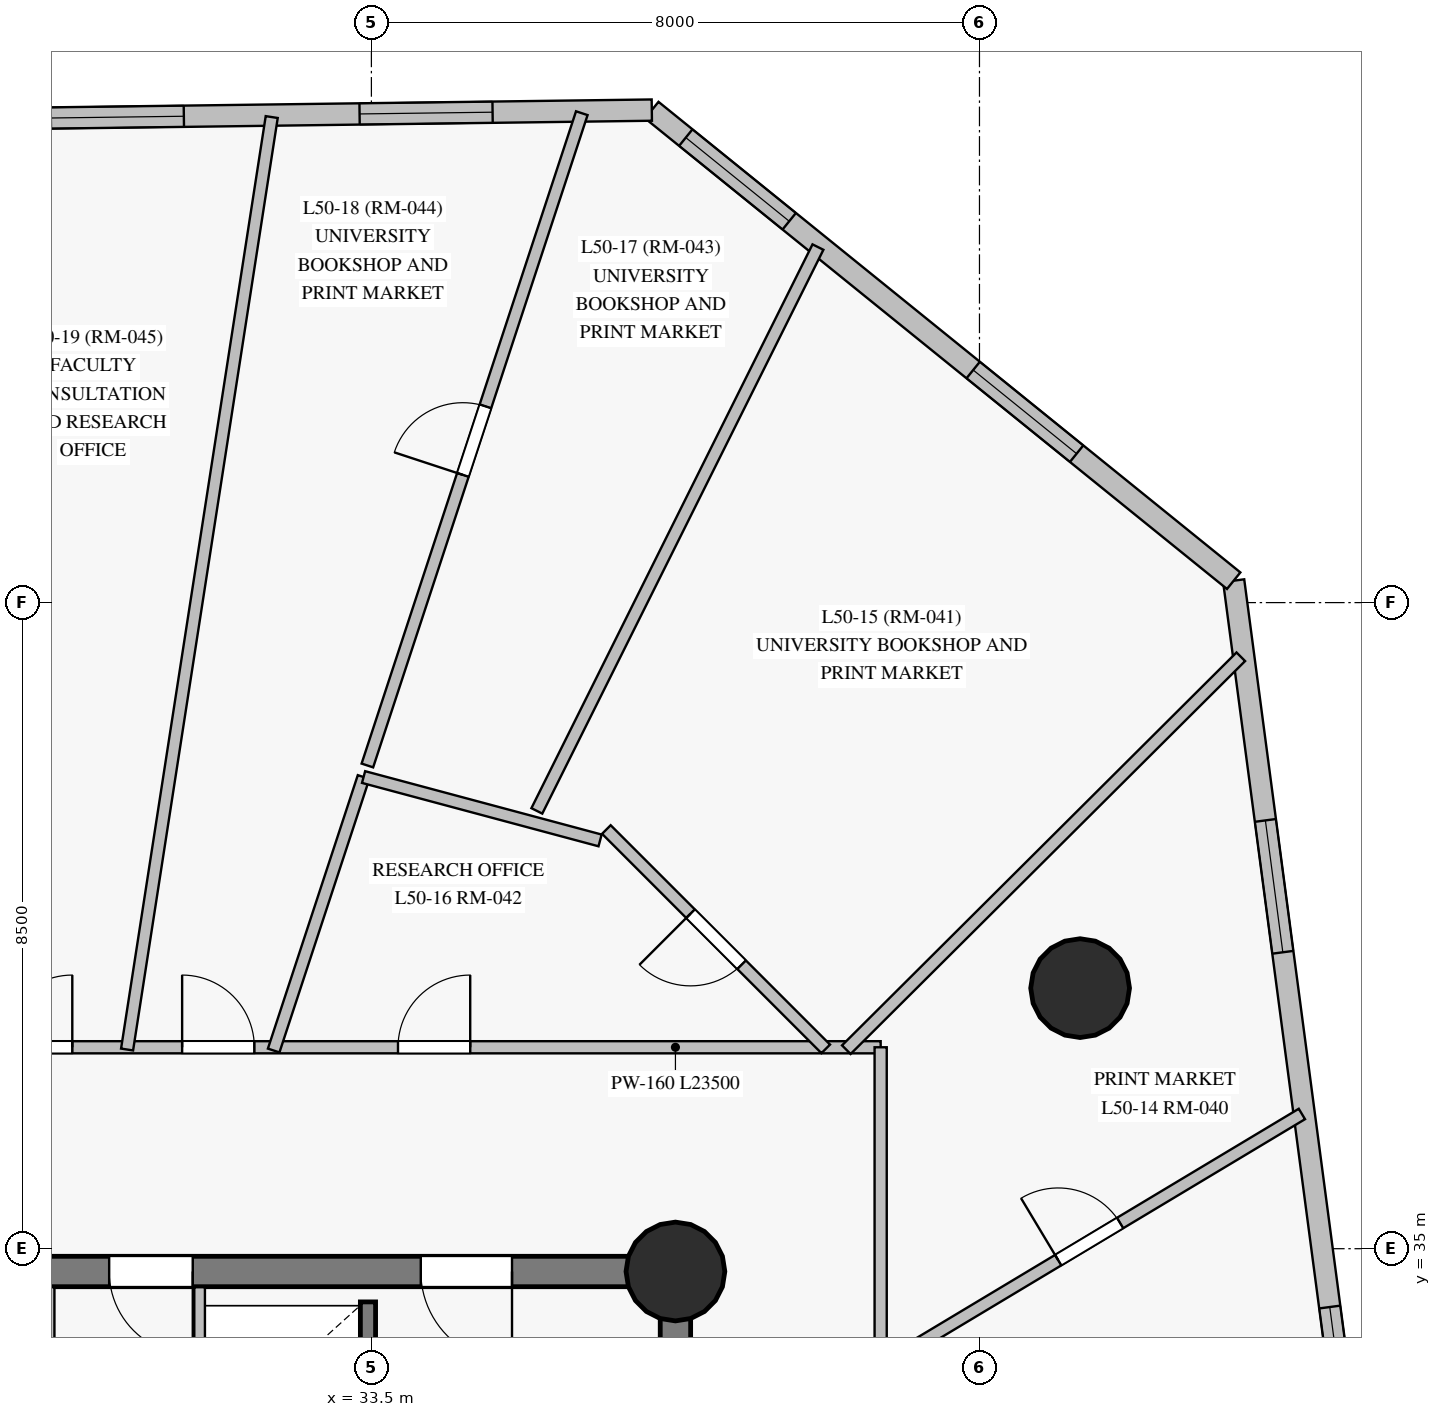
"""IFC4 building model, lengths in metres.
Left out: names, types, materials, properties, quantities, classifications, styles, units other than length and angle.
Written with IfcOpenShell. Run it as: python <this file> out.ifc"""

import sys

from ifc_helpers import new_model, si_unit, direction, frame, frame_2d, origin, origin_with_axes, origin_2d, place, context, subcontext, project, spatial, rectangle, circle, extrude, source, transform, mapped, element, fill, save


model = new_model("IFC4")
c1 = context("Model", 3, precision=1e-05, world=origin(), true_north=direction((0.0, 1.0)))
c2 = subcontext(c1, "Body", "Model", "MODEL_VIEW")
j1 = project(units=[si_unit("LENGTHUNIT", "METRE"), si_unit("PLANEANGLEUNIT", "RADIAN")], contexts=[c1])
p1 = place(None, origin())
s1 = spatial("IfcSite", under=j1, at=p1, CompositionType="ELEMENT")
p2 = place(p1, origin())
s2 = spatial("IfcBuilding", under=s1, at=p2, CompositionType="ELEMENT")
p3 = place(p2, frame((0.0, 0.0, 174.85)))
s3 = spatial("IfcBuildingStorey", under=s2, at=p3, CompositionType="ELEMENT", Elevation=174.85)
p4 = place(p3, frame((37.5, 18.3, 0.0), z_axis=(0.0, 0.0, 1.0), x_axis=(0.0, 1.0, 0.0)))
e1 = element("IfcWall", 1, at=p4, inside=s3, PredefinedType="SHEAR", context=c2, shape_type="SweptSolid", body=[
    extrude(rectangle(XDim=16.4, YDim=0.4, at=frame_2d((8.2, 0.0))), origin(), (0.0, 0.0, 1.0), 2.825),
])
p5 = place(p4, frame((14.15, 0.0, 0.0)))
e2 = element("IfcOpeningElement", 2, at=p5, cuts=e1, PredefinedType="OPENING", context=c2, shape_type="SweptSolid", body=[
    extrude(rectangle(XDim=1.2, YDim=2.15, at=frame_2d((0.6, 1.075))), frame((0.0, 0.21, 0.0), z_axis=(0.0, -1.0, 0.0), x_axis=(1.0, 0.0, 0.0)), (0.0, 0.0, 1.0), 0.42),
])
p6 = place(p3, frame((37.5, 34.7, 0.0), z_axis=(0.0, 0.0, 1.0), x_axis=(-1.0, 0.0, 0.0)))
e3 = element("IfcWall", 3, at=p6, inside=s3, PredefinedType="SHEAR", context=c2, shape_type="SweptSolid", body=[
    extrude(rectangle(XDim=10.95, YDim=0.4, at=frame_2d((5.475, 0.0))), origin(), (0.0, 0.0, 1.0), 2.825),
])
p7 = place(p6, frame((2.15, 0.0, 0.0)))
e4 = element("IfcOpeningElement", 4, at=p7, cuts=e3, PredefinedType="OPENING", context=c2, shape_type="SweptSolid", body=[
    extrude(rectangle(XDim=1.2, YDim=2.15, at=frame_2d((0.6, 1.075))), frame((0.0, 0.21, 0.0), z_axis=(0.0, -1.0, 0.0), x_axis=(1.0, 0.0, 0.0)), (0.0, 0.0, 1.0), 0.42),
])
p8 = place(p6, frame((6.35, 0.0, 0.0)))
e5 = element("IfcOpeningElement", 5, at=p8, cuts=e3, PredefinedType="OPENING", context=c2, shape_type="SweptSolid", body=[
    extrude(rectangle(XDim=1.1, YDim=2.15, at=frame_2d((0.55, 1.075))), frame((0.0, 0.21, 0.0), z_axis=(0.0, -1.0, 0.0), x_axis=(1.0, 0.0, 0.0)), (0.0, 0.0, 1.0), 0.42),
])
m1 = source(origin_with_axes(), c2, "Body", "SweptSolid", [
    extrude(circle(Radius=0.65, at=origin_2d()), origin(), (0.0, 0.0, 1.0), 3.05),
])
for number, where, z_axis, x_axis in (
    (6, (37.5, 34.7, 0.0), (0.0, 0.0, 1.0), (1.0, 0.0, 0.0)),
    (7, (42.824, 38.428, 0.0), (0.0, 0.0, 1.0), (1.0, 0.0, 0.0)),
):
    element("IfcColumn", number, at=place(p3, frame(where, z_axis=z_axis, x_axis=x_axis)), inside=s3, PredefinedType="COLUMN", context=c2, shape_type="MappedRepresentation", body=[
        mapped(m1, transform((0.0, 0.0, 0.0), scale=1.0)),
    ])
p9 = place(p3, frame((46.697, 29.785, 0.0), z_axis=(0.0, 0.0, 1.0), x_axis=(-0.131149267022, 0.991362632824, 0.0)))
e8 = element("IfcWall", 8, at=p9, inside=s3, PredefinedType="SOLIDWALL", context=c2, shape_type="SweptSolid", body=[
    extrude(rectangle(XDim=14.125, YDim=0.28, at=frame_2d((7.063, 0.0))), origin(), (0.0, 0.0, 1.0), 2.825),
])
p10 = place(p9, frame((2.737, 0.0, 0.85)))
e9 = element("IfcOpeningElement", 9, at=p10, cuts=e8, PredefinedType="OPENING", context=c2, shape_type="SweptSolid", body=[
    extrude(rectangle(XDim=1.75, YDim=1.65, at=frame_2d((0.875, 0.825))), frame((0.0, 0.15, 0.0), z_axis=(0.0, -1.0, 0.0), x_axis=(1.0, 0.0, 0.0)), (0.0, 0.0, 1.0), 0.3),
])
p11 = place(p9, frame((9.194, 0.0, 0.85)))
e10 = element("IfcOpeningElement", 10, at=p11, cuts=e8, PredefinedType="OPENING", context=c2, shape_type="SweptSolid", body=[
    extrude(rectangle(XDim=1.75, YDim=1.65, at=frame_2d((0.875, 0.825))), frame((0.0, 0.15, 0.0), z_axis=(0.0, -1.0, 0.0), x_axis=(1.0, 0.0, 0.0)), (0.0, 0.0, 1.0), 0.3),
])
p12 = place(p3, frame((44.844, 43.788, 0.0), z_axis=(0.0, 0.0, 1.0), x_axis=(-0.777531220347, 0.628844337961, 0.0)))
e11 = element("IfcWall", 11, at=p12, inside=s3, PredefinedType="SOLIDWALL", context=c2, shape_type="SweptSolid", body=[
    extrude(rectangle(XDim=9.845, YDim=0.28, at=frame_2d((4.923, 0.0))), origin(), (0.0, 0.0, 1.0), 2.825),
])
p13 = place(p12, frame((2.657, 0.0, 0.85)))
e12 = element("IfcOpeningElement", 12, at=p13, cuts=e11, PredefinedType="OPENING", context=c2, shape_type="SweptSolid", body=[
    extrude(rectangle(XDim=1.75, YDim=1.65, at=frame_2d((0.875, 0.825))), frame((0.0, 0.15, 0.0), z_axis=(0.0, -1.0, 0.0), x_axis=(1.0, 0.0, 0.0)), (0.0, 0.0, 1.0), 0.3),
])
p14 = place(p12, frame((7.52, 0.0, 0.85)))
e13 = element("IfcOpeningElement", 13, at=p14, cuts=e11, PredefinedType="OPENING", context=c2, shape_type="SweptSolid", body=[
    extrude(rectangle(XDim=1.75, YDim=1.65, at=frame_2d((0.875, 0.825))), frame((0.0, 0.15, 0.0), z_axis=(0.0, -1.0, 0.0), x_axis=(1.0, 0.0, 0.0)), (0.0, 0.0, 1.0), 0.3),
])
p15 = place(p3, frame((37.189, 49.979, 0.0), z_axis=(0.0, 0.0, 1.0), x_axis=(-0.999913830064, -0.013127545317, 0.0)))
e14 = element("IfcWall", 14, at=p15, inside=s3, PredefinedType="SOLIDWALL", context=c2, shape_type="SweptSolid", body=[
    extrude(rectangle(XDim=12.535, YDim=0.28, at=frame_2d((6.267, 0.0))), origin(), (0.0, 0.0, 1.0), 2.825),
])
p16 = place(p15, frame((2.095, 0.0, 0.85)))
e15 = element("IfcOpeningElement", 15, at=p16, cuts=e14, PredefinedType="OPENING", context=c2, shape_type="SweptSolid", body=[
    extrude(rectangle(XDim=1.75, YDim=1.65, at=frame_2d((0.875, 0.825))), frame((0.0, 0.15, 0.0), z_axis=(0.0, -1.0, 0.0), x_axis=(1.0, 0.0, 0.0)), (0.0, 0.0, 1.0), 0.3),
])
p17 = place(p15, frame((6.157, 0.0, 0.85)))
e16 = element("IfcOpeningElement", 16, at=p17, cuts=e14, PredefinedType="OPENING", context=c2, shape_type="SweptSolid", body=[
    extrude(rectangle(XDim=1.75, YDim=1.65, at=frame_2d((0.875, 0.825))), frame((0.0, 0.15, 0.0), z_axis=(0.0, -1.0, 0.0), x_axis=(1.0, 0.0, 0.0)), (0.0, 0.0, 1.0), 0.3),
])
p18 = place(p15, frame((9.56, 0.0, 0.85)))
e17 = element("IfcOpeningElement", 17, at=p18, cuts=e14, PredefinedType="OPENING", context=c2, shape_type="SweptSolid", body=[
    extrude(rectangle(XDim=0.95, YDim=1.5, at=frame_2d((0.475, 0.75))), frame((0.0, 0.15, 0.0), z_axis=(0.0, -1.0, 0.0), x_axis=(1.0, 0.0, 0.0)), (0.0, 0.0, 1.0), 0.3),
])
p19 = place(p3, frame((33.455, 18.7, 0.0), z_axis=(0.0, 0.0, 1.0), x_axis=(0.0, 1.0, 0.0)))
e18 = element("IfcWall", 18, at=p19, inside=s3, PredefinedType="SHEAR", context=c2, shape_type="SweptSolid", body=[
    extrude(rectangle(XDim=15.6, YDim=0.2, at=frame_2d((7.8, 0.0))), origin(), (0.0, 0.0, 1.0), 2.825),
])
p20 = place(p19, frame((2.75, 0.0, 0.0)))
e19 = element("IfcOpeningElement", 19, at=p20, cuts=e18, PredefinedType="OPENING", context=c2, shape_type="SweptSolid", body=[
    extrude(rectangle(XDim=1.15, YDim=2.15, at=frame_2d((0.575, 1.075))), frame((0.0, 0.11, 0.0), z_axis=(0.0, -1.0, 0.0), x_axis=(1.0, 0.0, 0.0)), (0.0, 0.0, 1.0), 0.22),
])
p21 = place(p19, frame((0.55, 0.0, 0.0)))
e20 = element("IfcOpeningElement", 20, at=p21, cuts=e18, PredefinedType="OPENING", context=c2, shape_type="SweptSolid", body=[
    extrude(rectangle(XDim=0.94, YDim=2.1, at=frame_2d((0.47, 1.05))), frame((0.0, 0.11, 0.0), z_axis=(0.0, -1.0, 0.0), x_axis=(1.0, 0.0, 0.0)), (0.0, 0.0, 1.0), 0.22),
])
p22 = place(p3, frame((16.7, 37.65, 0.0), z_axis=(0.0, 0.0, 1.0), x_axis=(1.0, 0.0, 0.0)))
e21 = element("IfcWall", 21, at=p22, inside=s3, PredefinedType="PARTITIONING", context=c2, shape_type="SweptSolid", body=[
    extrude(rectangle(XDim=23.5, YDim=0.16, at=frame_2d((11.75, 0.0))), origin(), (0.0, 0.0, 1.0), 2.375),
])
p23 = place(p22, frame((17.15, 0.0, 0.0)))
e22 = element("IfcOpeningElement", 22, at=p23, cuts=e21, PredefinedType="OPENING", context=c2, shape_type="SweptSolid", body=[
    extrude(rectangle(XDim=0.95, YDim=2.15, at=frame_2d((0.475, 1.075))), frame((0.0, 0.09, 0.0), z_axis=(0.0, -1.0, 0.0), x_axis=(1.0, 0.0, 0.0)), (0.0, 0.0, 1.0), 0.18),
])
p24 = place(p22, frame((14.31, 0.0, 0.0)))
e23 = element("IfcOpeningElement", 23, at=p24, cuts=e21, PredefinedType="OPENING", context=c2, shape_type="SweptSolid", body=[
    extrude(rectangle(XDim=0.95, YDim=2.15, at=frame_2d((0.475, 1.075))), frame((0.0, 0.09, 0.0), z_axis=(0.0, -1.0, 0.0), x_axis=(1.0, 0.0, 0.0)), (0.0, 0.0, 1.0), 0.18),
])
p25 = place(p22, frame((11.915, 0.0, 0.0)))
e24 = element("IfcOpeningElement", 24, at=p25, cuts=e21, PredefinedType="OPENING", context=c2, shape_type="SweptSolid", body=[
    extrude(rectangle(XDim=0.95, YDim=2.15, at=frame_2d((0.475, 1.075))), frame((0.0, 0.09, 0.0), z_axis=(0.0, -1.0, 0.0), x_axis=(1.0, 0.0, 0.0)), (0.0, 0.0, 1.0), 0.18),
])
p26 = place(p22, frame((7.75, 0.0, 0.0)))
e25 = element("IfcOpeningElement", 25, at=p26, cuts=e21, PredefinedType="OPENING", context=c2, shape_type="SweptSolid", body=[
    extrude(rectangle(XDim=0.95, YDim=2.15, at=frame_2d((0.475, 1.075))), frame((0.0, 0.09, 0.0), z_axis=(0.0, -1.0, 0.0), x_axis=(1.0, 0.0, 0.0)), (0.0, 0.0, 1.0), 0.18),
])
p27 = place(p22, frame((5.01, 0.0, 0.0)))
e26 = element("IfcOpeningElement", 26, at=p27, cuts=e21, PredefinedType="OPENING", context=c2, shape_type="SweptSolid", body=[
    extrude(rectangle(XDim=0.95, YDim=2.15, at=frame_2d((0.475, 1.075))), frame((0.0, 0.09, 0.0), z_axis=(0.0, -1.0, 0.0), x_axis=(1.0, 0.0, 0.0)), (0.0, 0.0, 1.0), 0.18),
])
p28 = place(p22, frame((0.257, 0.0, 0.0)))
e27 = element("IfcOpeningElement", 27, at=p28, cuts=e21, PredefinedType="OPENING", context=c2, shape_type="SweptSolid", body=[
    extrude(rectangle(XDim=0.95, YDim=2.15, at=frame_2d((0.475, 1.075))), frame((0.0, 0.09, 0.0), z_axis=(0.0, -1.0, 0.0), x_axis=(1.0, 0.0, 0.0)), (0.0, 0.0, 1.0), 0.18),
])
p29 = place(p3, frame((40.2, 37.65, 0.0), z_axis=(0.0, 0.0, 1.0), x_axis=(0.0, -1.0, 0.0)))
e28 = element("IfcWall", 28, at=p29, inside=s3, PredefinedType="PARTITIONING", context=c2, shape_type="SweptSolid", body=[
    extrude(rectangle(XDim=22.3, YDim=0.16, at=frame_2d((11.15, 0.0))), origin(), (0.0, 0.0, 1.0), 2.375),
])
p30 = place(p29, frame((14.02, 0.0, 0.0)))
e29 = element("IfcOpeningElement", 29, at=p30, cuts=e28, PredefinedType="OPENING", context=c2, shape_type="SweptSolid", body=[
    extrude(rectangle(XDim=0.95, YDim=2.15, at=frame_2d((0.475, 1.075))), frame((0.0, 0.09, 0.0), z_axis=(0.0, -1.0, 0.0), x_axis=(1.0, 0.0, 0.0)), (0.0, 0.0, 1.0), 0.18),
])
p31 = place(p29, frame((10.675, 0.0, 0.0)))
e30 = element("IfcOpeningElement", 30, at=p31, cuts=e28, PredefinedType="OPENING", context=c2, shape_type="SweptSolid", body=[
    extrude(rectangle(XDim=0.95, YDim=2.15, at=frame_2d((0.475, 1.075))), frame((0.0, 0.09, 0.0), z_axis=(0.0, -1.0, 0.0), x_axis=(1.0, 0.0, 0.0)), (0.0, 0.0, 1.0), 0.18),
])
p32 = place(p29, frame((7.33, 0.0, 0.0)))
e31 = element("IfcOpeningElement", 31, at=p32, cuts=e28, PredefinedType="OPENING", context=c2, shape_type="SweptSolid", body=[
    extrude(rectangle(XDim=0.95, YDim=2.15, at=frame_2d((0.475, 1.075))), frame((0.0, 0.09, 0.0), z_axis=(0.0, -1.0, 0.0), x_axis=(1.0, 0.0, 0.0)), (0.0, 0.0, 1.0), 0.18),
])
p33 = place(p3, frame((30.286, 37.62, 0.0), z_axis=(0.0, 0.0, 1.0), x_axis=(0.153299914958, 0.98817970839, 0.0)))
e32 = element("IfcWall", 32, at=p33, inside=s3, PredefinedType="PARTITIONING", context=c2, shape_type="SweptSolid", body=[
    extrude(rectangle(XDim=12.414, YDim=0.16, at=frame_2d((6.207, 0.0))), origin(), (0.0, 0.0, 1.0), 2.825),
])
p34 = place(p3, frame((33.447, 41.357, 0.0), z_axis=(0.0, 0.0, 1.0), x_axis=(0.312268283986, 0.949993957253, 0.0)))
e33 = element("IfcWall", 33, at=p34, inside=s3, PredefinedType="PARTITIONING", context=c2, shape_type="SweptSolid", body=[
    extrude(rectangle(XDim=9.033, YDim=0.16, at=frame_2d((4.517, 0.0))), origin(), (0.0, 0.0, 1.0), 2.825),
])
p35 = place(p34, frame((4.024, 0.0, 0.0)))
e34 = element("IfcOpeningElement", 34, at=p35, cuts=e33, PredefinedType="OPENING", context=c2, shape_type="SweptSolid", body=[
    extrude(rectangle(XDim=0.95, YDim=2.15, at=frame_2d((0.475, 1.075))), frame((0.0, 0.09, 0.0), z_axis=(0.0, -1.0, 0.0), x_axis=(1.0, 0.0, 0.0)), (0.0, 0.0, 1.0), 0.18),
])
p36 = place(p3, frame((35.677, 40.76, 0.0), z_axis=(0.0, 0.0, 1.0), x_axis=(0.446200020904, 0.894933260833, 0.0)))
e35 = element("IfcWall", 35, at=p36, inside=s3, PredefinedType="PARTITIONING", context=c2, shape_type="SweptSolid", body=[
    extrude(rectangle(XDim=8.288, YDim=0.16, at=frame_2d((4.144, 0.0))), origin(), (0.0, 0.0, 1.0), 2.825),
])
p37 = place(p3, frame((39.748, 37.618, 0.0), z_axis=(0.0, 0.0, 1.0), x_axis=(0.708505208344, 0.705705582909, 0.0)))
e36 = element("IfcWall", 36, at=p37, inside=s3, PredefinedType="PARTITIONING", context=c2, shape_type="SweptSolid", body=[
    extrude(rectangle(XDim=7.325, YDim=0.16, at=frame_2d((3.663, 0.0))), origin(), (0.0, 0.0, 1.0), 2.825),
])
p38 = place(p3, frame((40.174, 33.433, 0.0), z_axis=(0.0, 0.0, 1.0), x_axis=(0.857549328382, 0.514401739297, 0.0)))
e37 = element("IfcWall", 37, at=p38, inside=s3, PredefinedType="PARTITIONING", context=c2, shape_type="SweptSolid", body=[
    extrude(rectangle(XDim=6.492, YDim=0.16, at=frame_2d((3.246, 0.0))), origin(), (0.0, 0.0, 1.0), 2.825),
])
p39 = place(p38, frame((2.754, 0.0, 0.0)))
e38 = element("IfcOpeningElement", 38, at=p39, cuts=e37, PredefinedType="OPENING", context=c2, shape_type="SweptSolid", body=[
    extrude(rectangle(XDim=0.95, YDim=2.15, at=frame_2d((0.475, 1.075))), frame((0.0, 0.09, 0.0), z_axis=(0.0, -1.0, 0.0), x_axis=(1.0, 0.0, 0.0)), (0.0, 0.0, 1.0), 0.18),
])
p40 = place(p3, frame((39.477, 37.629, 0.0), z_axis=(0.0, 0.0, 1.0), x_axis=(-0.707136690743, 0.707076870365, 0.0)))
e39 = element("IfcWall", 39, at=p40, inside=s3, PredefinedType="PARTITIONING", context=c2, shape_type="SweptSolid", body=[
    extrude(rectangle(XDim=4.081, YDim=0.16, at=frame_2d((2.041, 0.0))), origin(), (0.0, 0.0, 1.0), 2.375),
])
p41 = place(p40, frame((1.566, 0.0, 0.0)))
e40 = element("IfcOpeningElement", 40, at=p41, cuts=e39, PredefinedType="OPENING", context=c2, shape_type="SweptSolid", body=[
    extrude(rectangle(XDim=0.95, YDim=2.15, at=frame_2d((0.475, 1.075))), frame((0.0, 0.09, 0.0), z_axis=(0.0, -1.0, 0.0), x_axis=(1.0, 0.0, 0.0)), (0.0, 0.0, 1.0), 0.18),
])
for number, where, z_axis, x_axis in (
    (41, (29.26, 30.45, 0.0), (0.0, 0.0, 1.0), (0.0, 1.0, 0.0)),
    (42, (31.24, 30.45, 0.0), (0.0, 0.0, 1.0), (0.0, 1.0, 0.0)),
):
    element("IfcWall", number, at=place(p3, frame(where, z_axis=z_axis, x_axis=x_axis)), inside=s3, PredefinedType="PARTITIONING", context=c2, shape_type="SweptSolid", body=[
        extrude(rectangle(XDim=4.043, YDim=0.14, at=frame_2d((2.021, 0.0))), origin(), (0.0, 0.0, 1.0), 2.825),
    ])
p42 = place(p3, frame((32.214, 37.607, 0.0), z_axis=(0.0, 0.0, 1.0), x_axis=(0.312337810946, 0.949971100536, 0.0)))
e43 = element("IfcWall", 43, at=p42, inside=s3, PredefinedType="PARTITIONING", context=c2, shape_type="SweptSolid", body=[
    extrude(rectangle(XDim=3.787, YDim=0.16, at=frame_2d((1.894, 0.0))), origin(), (0.0, 0.0, 1.0), 2.825),
])
p43 = place(p3, frame((33.397, 41.205, 0.0), z_axis=(0.0, 0.0, 1.0), x_axis=(0.965920984925, -0.258837112643, 0.0)))
e44 = element("IfcWall", 44, at=p43, inside=s3, PredefinedType="PARTITIONING", context=c2, shape_type="SweptSolid", body=[
    extrude(rectangle(XDim=3.221, YDim=0.16, at=frame_2d((1.611, 0.0))), origin(), (0.0, 0.0, 1.0), 2.495),
])
m2 = source(origin_with_axes(), c2, "Body", "SweptSolid", [
    extrude(rectangle(XDim=1.75, YDim=1.65, at=frame_2d((0.875, 0.825))), frame((0.0, 0.03, 0.0), z_axis=(0.0, -1.0, 0.0), x_axis=(1.0, 0.0, 0.0)), (0.0, 0.0, 1.0), 0.06),
])
p44 = place(p10, origin())
e45 = element("IfcWindow", 45, at=p44, inside=s3, PartitioningType="SINGLE_PANEL", PredefinedType="WINDOW", context=c2, shape_type="MappedRepresentation", body=[
    mapped(m2, transform((0.0, 0.0, 0.0), scale=1.0)),
])
fill(e9, e45)
p45 = place(p11, origin())
e46 = element("IfcWindow", 46, at=p45, inside=s3, PartitioningType="SINGLE_PANEL", PredefinedType="WINDOW", context=c2, shape_type="MappedRepresentation", body=[
    mapped(m2, transform((0.0, 0.0, 0.0), scale=1.0)),
])
fill(e10, e46)
p46 = place(p13, origin())
e47 = element("IfcWindow", 47, at=p46, inside=s3, PartitioningType="SINGLE_PANEL", PredefinedType="WINDOW", context=c2, shape_type="MappedRepresentation", body=[
    mapped(m2, transform((0.0, 0.0, 0.0), scale=1.0)),
])
fill(e12, e47)
p47 = place(p14, origin())
e48 = element("IfcWindow", 48, at=p47, inside=s3, PartitioningType="SINGLE_PANEL", PredefinedType="WINDOW", context=c2, shape_type="MappedRepresentation", body=[
    mapped(m2, transform((0.0, 0.0, 0.0), scale=1.0)),
])
fill(e13, e48)
p48 = place(p16, origin())
e49 = element("IfcWindow", 49, at=p48, inside=s3, PartitioningType="SINGLE_PANEL", PredefinedType="WINDOW", context=c2, shape_type="MappedRepresentation", body=[
    mapped(m2, transform((0.0, 0.0, 0.0), scale=1.0)),
])
fill(e15, e49)
p49 = place(p17, origin())
e50 = element("IfcWindow", 50, at=p49, inside=s3, PartitioningType="SINGLE_PANEL", PredefinedType="WINDOW", context=c2, shape_type="MappedRepresentation", body=[
    mapped(m2, transform((0.0, 0.0, 0.0), scale=1.0)),
])
fill(e16, e50)
m3 = source(origin_with_axes(), c2, "Body", "SweptSolid", [
    extrude(rectangle(XDim=1.2, YDim=2.15, at=frame_2d((0.6, 1.075))), frame((0.0, 0.025, 0.0), z_axis=(0.0, -1.0, 0.0), x_axis=(1.0, 0.0, 0.0)), (0.0, 0.0, 1.0), 0.05),
])
p50 = place(p7, origin())
e51 = element("IfcDoor", 51, at=p50, inside=s3, OperationType="SINGLE_SWING_LEFT", PredefinedType="DOOR", context=c2, shape_type="MappedRepresentation", body=[
    mapped(m3, transform((0.0, 0.0, 0.0), scale=1.0)),
])
fill(e4, e51)
m4 = source(origin_with_axes(), c2, "Body", "SweptSolid", [
    extrude(rectangle(XDim=1.1, YDim=2.15, at=frame_2d((0.55, 1.075))), frame((0.0, 0.025, 0.0), z_axis=(0.0, -1.0, 0.0), x_axis=(1.0, 0.0, 0.0)), (0.0, 0.0, 1.0), 0.05),
])
p51 = place(p8, origin())
e52 = element("IfcDoor", 52, at=p51, inside=s3, OperationType="SINGLE_SWING_LEFT", PredefinedType="DOOR", context=c2, shape_type="MappedRepresentation", body=[
    mapped(m4, transform((0.0, 0.0, 0.0), scale=1.0)),
])
fill(e5, e52)
m5 = source(origin_with_axes(), c2, "Body", "SweptSolid", [
    extrude(rectangle(XDim=0.95, YDim=2.15, at=frame_2d((0.475, 1.075))), frame((0.0, 0.025, 0.0), z_axis=(0.0, -1.0, 0.0), x_axis=(1.0, 0.0, 0.0)), (0.0, 0.0, 1.0), 0.05),
])
p52 = place(p23, origin())
e53 = element("IfcDoor", 53, at=p52, inside=s3, OperationType="SINGLE_SWING_RIGHT", PredefinedType="DOOR", context=c2, shape_type="MappedRepresentation", body=[
    mapped(m5, transform((0.0, 0.0, 0.0), scale=1.0)),
])
fill(e22, e53)
p53 = place(p24, origin())
e54 = element("IfcDoor", 54, at=p53, inside=s3, OperationType="SINGLE_SWING_LEFT", PredefinedType="DOOR", context=c2, shape_type="MappedRepresentation", body=[
    mapped(m5, transform((0.0, 0.0, 0.0), scale=1.0)),
])
fill(e23, e54)
p54 = place(p25, origin())
e55 = element("IfcDoor", 55, at=p54, inside=s3, OperationType="SINGLE_SWING_RIGHT", PredefinedType="DOOR", context=c2, shape_type="MappedRepresentation", body=[
    mapped(m5, transform((0.0, 0.0, 0.0), scale=1.0)),
])
fill(e24, e55)
p55 = place(p39, origin())
e56 = element("IfcDoor", 56, at=p55, inside=s3, OperationType="SINGLE_SWING_LEFT", PredefinedType="DOOR", context=c2, shape_type="MappedRepresentation", body=[
    mapped(m5, transform((0.0, 0.0, 0.0), scale=1.0)),
])
fill(e38, e56)
p56 = place(p41, origin())
e57 = element("IfcDoor", 57, at=p56, inside=s3, OperationType="SINGLE_SWING_RIGHT", PredefinedType="DOOR", context=c2, shape_type="MappedRepresentation", body=[
    mapped(m5, transform((0.0, 0.0, 0.0), scale=1.0)),
])
fill(e40, e57)
p57 = place(p35, origin())
e58 = element("IfcDoor", 58, at=p57, inside=s3, OperationType="SINGLE_SWING_LEFT", PredefinedType="DOOR", context=c2, shape_type="MappedRepresentation", body=[
    mapped(m5, transform((0.0, 0.0, 0.0), scale=1.0)),
])
fill(e34, e58)
save(model, sys.argv[1])
